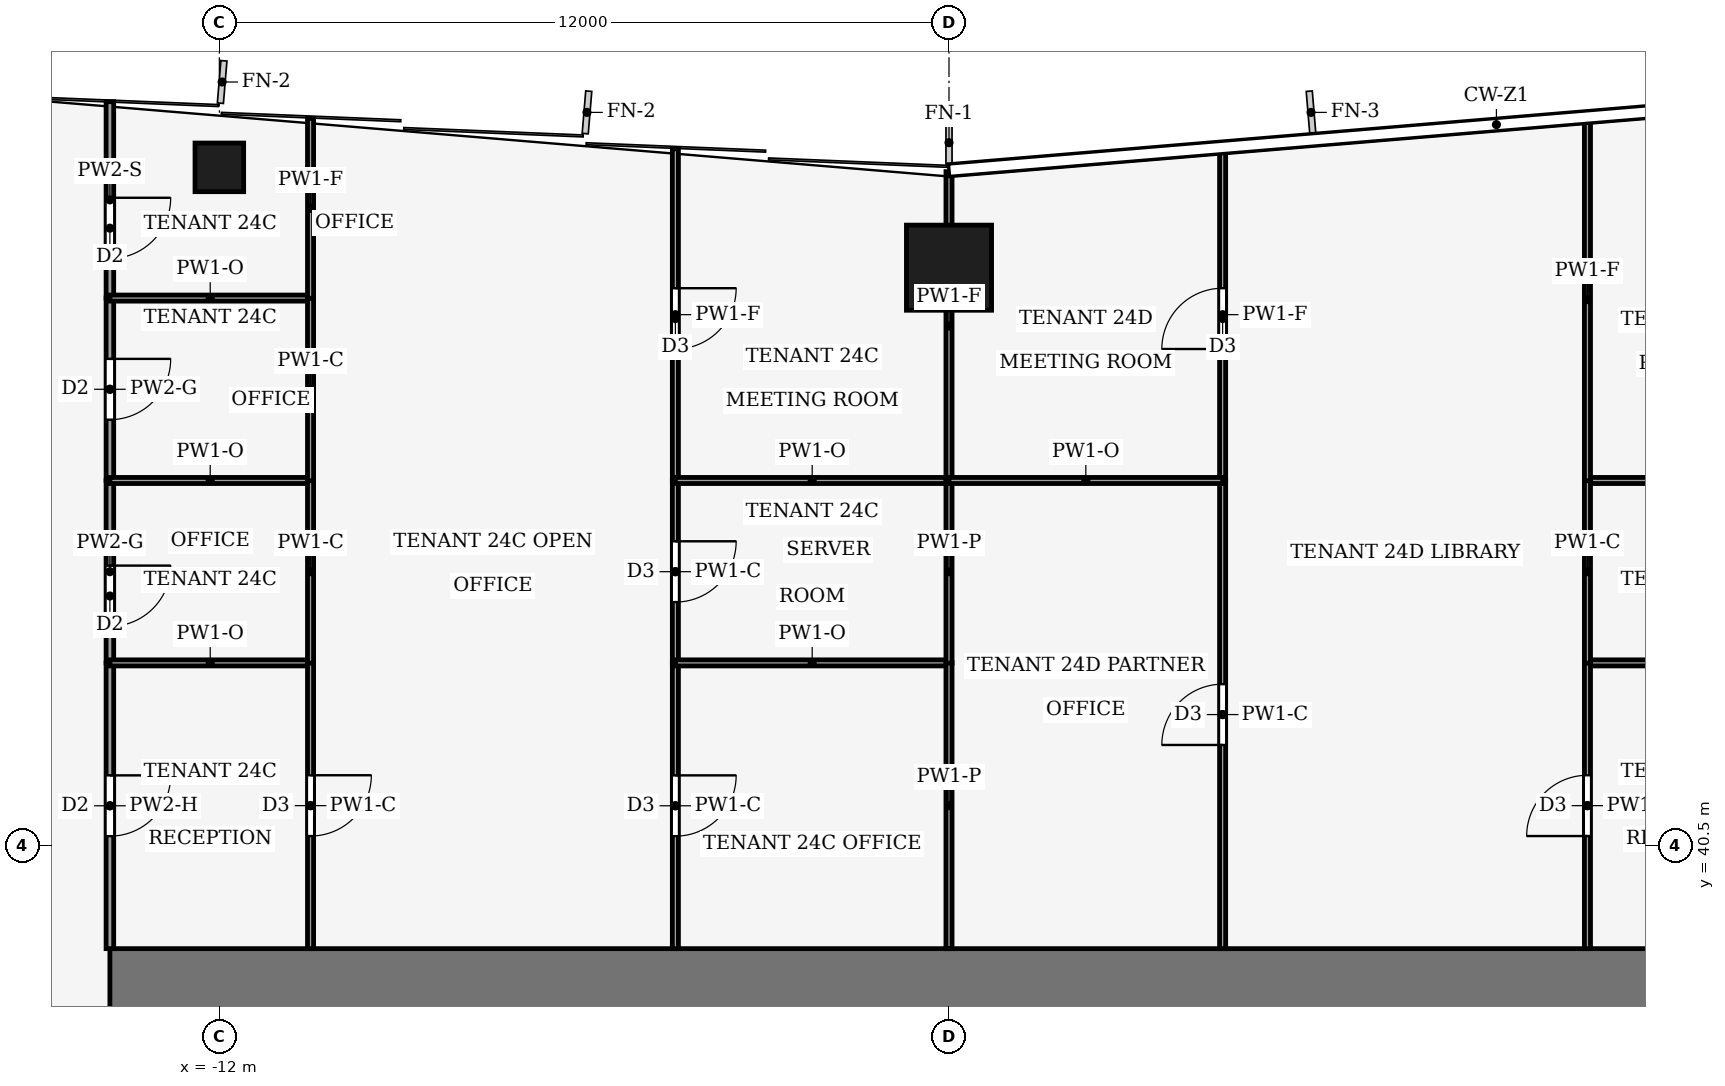
"""IFC4 building model, lengths in metres.
Left out: names, types, materials, properties, quantities, classifications, styles, units other than length and angle.
Written with IfcOpenShell. Run it as: python <this file> out.ifc"""

import sys

from ifc_helpers import new_model, si_unit, direction, frame, frame_2d, origin, origin_2d, place, context, subcontext, project, spatial, rectangle, hollow_rectangle, extrude, element, fill, save


model = new_model("IFC4")
c1 = context("Model", 3, precision=1e-05, world=origin(), true_north=direction((0.0, 1.0)))
c2 = subcontext(c1, "Body", "Model", "MODEL_VIEW")
j1 = project(units=[si_unit("LENGTHUNIT", "METRE"), si_unit("PLANEANGLEUNIT", "RADIAN")], contexts=[c1])
p1 = place(None, origin())
s1 = spatial("IfcSite", under=j1, at=p1, CompositionType="ELEMENT")
p2 = place(p1, origin())
s2 = spatial("IfcBuilding", under=s1, at=p2, CompositionType="ELEMENT")
p3 = place(p2, frame((0.0, 0.0, 106.0)))
s3 = spatial("IfcBuildingStorey", under=s2, at=p3, CompositionType="ELEMENT", Elevation=106.0)
p4 = place(p3, frame((-13.8, 38.2, -0.13), z_axis=(0.0, 0.0, 1.0), x_axis=(1.0, 0.0, 0.0)))
e1 = element("IfcWall", 1, at=p4, inside=s3, PredefinedType="SHEAR", context=c2, shape_type="SweptSolid", body=[
    extrude(rectangle(XDim=27.6, YDim=1.2, at=frame_2d((13.8, 0.0))), origin(), (0.0, 0.0, 1.0), 4.0),
])
p5 = place(p3, frame((0.0, 50.0, 0.0), z_axis=(0.0, 0.0, 1.0), x_axis=(1.0, 0.0, 0.0)))
e2 = element("IfcColumn", 2, at=p5, inside=s3, PredefinedType="COLUMN", context=c2, shape_type="SweptSolid", body=[
    extrude(hollow_rectangle(XDim=1.4, YDim=1.4, WallThickness=0.08, at=origin_2d()), origin(), (0.0, 0.0, 1.0), 4.0),
])
p6 = place(p3, frame((-12.0, 51.65, 0.0), z_axis=(0.0, 0.0, 1.0), x_axis=(1.0, 0.0, 0.0)))
e3 = element("IfcColumn", 3, at=p6, inside=s3, PredefinedType="COLUMN", context=c2, shape_type="SweptSolid", body=[
    extrude(hollow_rectangle(XDim=0.8, YDim=0.8, WallThickness=0.04, at=origin_2d()), origin(), (0.0, 0.0, 1.0), 4.0),
])
p7 = place(p3, frame((-13.8, 43.5, 0.0), z_axis=(0.0, 0.0, 1.0), x_axis=(0.0, -1.0, 0.0)))
e4 = element("IfcWall", 4, at=p7, inside=s3, PredefinedType="PARTITIONING", context=c2, shape_type="SweptSolid", body=[
    extrude(rectangle(XDim=4.7, YDim=0.125, at=frame_2d((2.35, 0.0))), origin(), (0.0, 0.0, 1.0), 3.14),
])
p8 = place(p7, frame((1.85, 0.0, 0.0)))
e5 = element("IfcOpeningElement", 5, at=p8, cuts=e4, PredefinedType="OPENING", context=c2, shape_type="SweptSolid", body=[
    extrude(rectangle(XDim=1.0, YDim=2.1, at=frame_2d((0.5, 1.05))), frame((0.0, 0.073, 0.0), z_axis=(0.0, -1.0, 0.0), x_axis=(1.0, 0.0, 0.0)), (0.0, 0.0, 1.0), 0.145),
])
p9 = place(p3, frame((-13.8, 46.5, 0.0), z_axis=(0.0, 0.0, 1.0), x_axis=(0.0, -1.0, 0.0)))
e6 = element("IfcWall", 6, at=p9, inside=s3, PredefinedType="PARTITIONING", context=c2, shape_type="SweptSolid", body=[
    extrude(rectangle(XDim=3.0, YDim=0.125, at=frame_2d((1.5, 0.0))), origin(), (0.0, 0.0, 1.0), 3.87),
])
p10 = place(p9, frame((1.4, 0.0, 0.0)))
e7 = element("IfcOpeningElement", 7, at=p10, cuts=e6, PredefinedType="OPENING", context=c2, shape_type="SweptSolid", body=[
    extrude(rectangle(XDim=1.0, YDim=2.1, at=frame_2d((0.5, 1.05))), frame((0.0, 0.073, 0.0), z_axis=(0.0, -1.0, 0.0), x_axis=(1.0, 0.0, 0.0)), (0.0, 0.0, 1.0), 0.145),
])
p11 = place(p3, frame((-13.8, 49.5, 0.0), z_axis=(0.0, 0.0, 1.0), x_axis=(0.0, -1.0, 0.0)))
e8 = element("IfcWall", 8, at=p11, inside=s3, PredefinedType="PARTITIONING", context=c2, shape_type="SweptSolid", body=[
    extrude(rectangle(XDim=3.0, YDim=0.125, at=frame_2d((1.5, 0.0))), origin(), (0.0, 0.0, 1.0), 3.87),
])
p12 = place(p11, frame((1.0, 0.0, 0.0)))
e9 = element("IfcOpeningElement", 9, at=p12, cuts=e8, PredefinedType="OPENING", context=c2, shape_type="SweptSolid", body=[
    extrude(rectangle(XDim=1.0, YDim=2.1, at=frame_2d((0.5, 1.05))), frame((0.0, 0.073, 0.0), z_axis=(0.0, -1.0, 0.0), x_axis=(1.0, 0.0, 0.0)), (0.0, 0.0, 1.0), 0.145),
])
p13 = place(p3, frame((-13.8, 52.73, 0.0), z_axis=(0.0, 0.0, 1.0), x_axis=(0.0, -1.0, 0.0)))
e10 = element("IfcWall", 10, at=p13, inside=s3, PredefinedType="PARTITIONING", context=c2, shape_type="SweptSolid", body=[
    extrude(rectangle(XDim=3.23, YDim=0.125, at=frame_2d((1.615, 0.0))), origin(), (0.0, 0.0, 1.0), 3.04),
])
p14 = place(p13, frame((1.58, 0.0, 0.0)))
e11 = element("IfcOpeningElement", 11, at=p14, cuts=e10, PredefinedType="OPENING", context=c2, shape_type="SweptSolid", body=[
    extrude(rectangle(XDim=1.0, YDim=2.1, at=frame_2d((0.5, 1.05))), frame((0.0, 0.073, 0.0), z_axis=(0.0, -1.0, 0.0), x_axis=(1.0, 0.0, 0.0)), (0.0, 0.0, 1.0), 0.145),
])
p15 = place(p3, frame((-10.5, 43.5, 0.0), z_axis=(0.0, 0.0, 1.0), x_axis=(-1.0, 0.0, 0.0)))
e12 = element("IfcWall", 12, at=p15, inside=s3, PredefinedType="PARTITIONING", context=c2, shape_type="SweptSolid", body=[
    extrude(rectangle(XDim=3.3, YDim=0.1, at=frame_2d((1.65, 0.0))), origin(), (0.0, 0.0, 1.0), 3.39),
])
p16 = place(p3, frame((-10.5, 43.504, 0.0), z_axis=(0.0, 0.0, 1.0), x_axis=(0.0, -1.0, 0.0)))
e13 = element("IfcWall", 13, at=p16, inside=s3, PredefinedType="PARTITIONING", context=c2, shape_type="SweptSolid", body=[
    extrude(rectangle(XDim=4.704, YDim=0.1, at=frame_2d((2.352, 0.0))), origin(), (0.0, 0.0, 1.0), 3.87),
])
p17 = place(p16, frame((1.852, 0.0, 0.0)))
e14 = element("IfcOpeningElement", 14, at=p17, cuts=e13, PredefinedType="OPENING", context=c2, shape_type="SweptSolid", body=[
    extrude(rectangle(XDim=1.0, YDim=2.1, at=frame_2d((0.5, 1.05))), frame((0.0, 0.06, 0.0), z_axis=(0.0, -1.0, 0.0), x_axis=(1.0, 0.0, 0.0)), (0.0, 0.0, 1.0), 0.12),
])
p18 = place(p3, frame((-10.5, 46.5, 0.0), z_axis=(0.0, 0.0, 1.0), x_axis=(-1.0, 0.0, 0.0)))
e15 = element("IfcWall", 15, at=p18, inside=s3, PredefinedType="PARTITIONING", context=c2, shape_type="SweptSolid", body=[
    extrude(rectangle(XDim=3.3, YDim=0.1, at=frame_2d((1.65, 0.0))), origin(), (0.0, 0.0, 1.0), 3.39),
])
p19 = place(p3, frame((-10.5, 43.496, 0.0), z_axis=(0.0, 0.0, 1.0), x_axis=(0.0, 1.0, 0.0)))
e16 = element("IfcWall", 16, at=p19, inside=s3, PredefinedType="PARTITIONING", context=c2, shape_type="SweptSolid", body=[
    extrude(rectangle(XDim=3.008, YDim=0.1, at=frame_2d((1.504, 0.0))), origin(), (0.0, 0.0, 1.0), 3.87),
])
p20 = place(p3, frame((-10.5, 49.5, 0.0), z_axis=(0.0, 0.0, 1.0), x_axis=(-1.0, 0.0, 0.0)))
e17 = element("IfcWall", 17, at=p20, inside=s3, PredefinedType="PARTITIONING", context=c2, shape_type="SweptSolid", body=[
    extrude(rectangle(XDim=3.3, YDim=0.1, at=frame_2d((1.65, 0.0))), origin(), (0.0, 0.0, 1.0), 3.39),
])
p21 = place(p3, frame((-10.5, 46.496, 0.0), z_axis=(0.0, 0.0, 1.0), x_axis=(0.0, 1.0, 0.0)))
e18 = element("IfcWall", 18, at=p21, inside=s3, PredefinedType="PARTITIONING", context=c2, shape_type="SweptSolid", body=[
    extrude(rectangle(XDim=3.008, YDim=0.1, at=frame_2d((1.504, 0.0))), origin(), (0.0, 0.0, 1.0), 3.87),
])
p22 = place(p3, frame((-10.5, 49.496, 0.0), z_axis=(0.0, 0.0, 1.0), x_axis=(0.0, 1.0, 0.0)))
e19 = element("IfcWall", 19, at=p22, inside=s3, PredefinedType="PARTITIONING", context=c2, shape_type="SweptSolid", body=[
    extrude(rectangle(XDim=2.959, YDim=0.1, at=frame_2d((1.479, 0.0))), origin(), (0.0, 0.0, 1.0), 3.04),
])
p23 = place(p3, frame((-4.5, 43.5, 0.0), z_axis=(0.0, 0.0, 1.0), x_axis=(0.0, -1.0, 0.0)))
e20 = element("IfcWall", 20, at=p23, inside=s3, PredefinedType="PARTITIONING", context=c2, shape_type="SweptSolid", body=[
    extrude(rectangle(XDim=4.7, YDim=0.1, at=frame_2d((2.35, 0.0))), origin(), (0.0, 0.0, 1.0), 3.87),
])
p24 = place(p23, frame((1.85, 0.0, 0.0)))
e21 = element("IfcOpeningElement", 21, at=p24, cuts=e20, PredefinedType="OPENING", context=c2, shape_type="SweptSolid", body=[
    extrude(rectangle(XDim=1.0, YDim=2.1, at=frame_2d((0.5, 1.05))), frame((0.0, 0.06, 0.0), z_axis=(0.0, -1.0, 0.0), x_axis=(1.0, 0.0, 0.0)), (0.0, 0.0, 1.0), 0.12),
])
p25 = place(p3, frame((-4.5, 46.5, 0.0), z_axis=(0.0, 0.0, 1.0), x_axis=(0.0, -1.0, 0.0)))
e22 = element("IfcWall", 22, at=p25, inside=s3, PredefinedType="PARTITIONING", context=c2, shape_type="SweptSolid", body=[
    extrude(rectangle(XDim=3.0, YDim=0.1, at=frame_2d((1.5, 0.0))), origin(), (0.0, 0.0, 1.0), 3.87),
])
p26 = place(p25, frame((1.0, 0.0, 0.0)))
e23 = element("IfcOpeningElement", 23, at=p26, cuts=e22, PredefinedType="OPENING", context=c2, shape_type="SweptSolid", body=[
    extrude(rectangle(XDim=1.0, YDim=2.1, at=frame_2d((0.5, 1.05))), frame((0.0, 0.06, 0.0), z_axis=(0.0, -1.0, 0.0), x_axis=(1.0, 0.0, 0.0)), (0.0, 0.0, 1.0), 0.12),
])
p27 = place(p3, frame((-4.5, 51.955, 0.0), z_axis=(0.0, 0.0, 1.0), x_axis=(0.0, -1.0, 0.0)))
e24 = element("IfcWall", 24, at=p27, inside=s3, PredefinedType="PARTITIONING", context=c2, shape_type="SweptSolid", body=[
    extrude(rectangle(XDim=5.455, YDim=0.1, at=frame_2d((2.728, 0.0))), origin(), (0.0, 0.0, 1.0), 3.04),
])
p28 = place(p27, frame((2.292, 0.0, 0.0)))
e25 = element("IfcOpeningElement", 25, at=p28, cuts=e24, PredefinedType="OPENING", context=c2, shape_type="SweptSolid", body=[
    extrude(rectangle(XDim=1.0, YDim=2.1, at=frame_2d((0.5, 1.05))), frame((0.0, 0.06, 0.0), z_axis=(0.0, -1.0, 0.0), x_axis=(1.0, 0.0, 0.0)), (0.0, 0.0, 1.0), 0.12),
])
p29 = place(p3, frame((0.0, 43.5, 0.0), z_axis=(0.0, 0.0, 1.0), x_axis=(-1.0, 0.0, 0.0)))
e26 = element("IfcWall", 26, at=p29, inside=s3, PredefinedType="PARTITIONING", context=c2, shape_type="SweptSolid", body=[
    extrude(rectangle(XDim=4.5, YDim=0.1, at=frame_2d((2.25, 0.0))), origin(), (0.0, 0.0, 1.0), 3.39),
])
p30 = place(p3, frame((0.0, 38.8, 0.0), z_axis=(0.0, 0.0, 1.0), x_axis=(0.0, 1.0, 0.0)))
e27 = element("IfcWall", 27, at=p30, inside=s3, PredefinedType="PARTITIONING", context=c2, shape_type="SweptSolid", body=[
    extrude(rectangle(XDim=4.704, YDim=0.1, at=frame_2d((2.352, 0.0))), origin(), (0.0, 0.0, 1.0), 3.44),
])
p31 = place(p3, frame((0.0, 46.5, 0.0), z_axis=(0.0, 0.0, 1.0), x_axis=(-1.0, 0.0, 0.0)))
e28 = element("IfcWall", 28, at=p31, inside=s3, PredefinedType="PARTITIONING", context=c2, shape_type="SweptSolid", body=[
    extrude(rectangle(XDim=4.5, YDim=0.1, at=frame_2d((2.25, 0.0))), origin(), (0.0, 0.0, 1.0), 3.39),
])
p32 = place(p3, frame((0.0, 43.496, 0.0), z_axis=(0.0, 0.0, 1.0), x_axis=(0.0, 1.0, 0.0)))
e29 = element("IfcWall", 29, at=p32, inside=s3, PredefinedType="PARTITIONING", context=c2, shape_type="SweptSolid", body=[
    extrude(rectangle(XDim=3.004, YDim=0.1, at=frame_2d((1.502, 0.0))), origin(), (0.0, 0.0, 1.0), 3.44),
])
p33 = place(p3, frame((0.0, 46.5, 0.0), z_axis=(0.0, 0.0, 1.0), x_axis=(0.0, 1.0, 0.0)))
e30 = element("IfcWall", 30, at=p33, inside=s3, PredefinedType="PARTITIONING", context=c2, shape_type="SweptSolid", body=[
    extrude(rectangle(XDim=5.08, YDim=0.1, at=frame_2d((2.54, 0.0))), origin(), (0.0, 0.0, 1.0), 3.04),
])
p34 = place(p3, frame((13.8, 43.5, 0.0), z_axis=(0.0, 0.0, 1.0), x_axis=(-1.0, 0.0, 0.0)))
e31 = element("IfcWall", 31, at=p34, inside=s3, PredefinedType="PARTITIONING", context=c2, shape_type="SweptSolid", body=[
    extrude(rectangle(XDim=3.3, YDim=0.1, at=frame_2d((1.65, 0.0))), origin(), (0.0, 0.0, 1.0), 3.39),
])
p35 = place(p3, frame((10.5, 38.8, 0.0), z_axis=(0.0, 0.0, 1.0), x_axis=(0.0, 1.0, 0.0)))
e32 = element("IfcWall", 32, at=p35, inside=s3, PredefinedType="PARTITIONING", context=c2, shape_type="SweptSolid", body=[
    extrude(rectangle(XDim=4.704, YDim=0.1, at=frame_2d((2.352, 0.0))), origin(), (0.0, 0.0, 1.0), 3.87),
])
p36 = place(p35, frame((1.852, 0.0, 0.0)))
e33 = element("IfcOpeningElement", 33, at=p36, cuts=e32, PredefinedType="OPENING", context=c2, shape_type="SweptSolid", body=[
    extrude(rectangle(XDim=1.0, YDim=2.1, at=frame_2d((0.5, 1.05))), frame((0.0, 0.06, 0.0), z_axis=(0.0, -1.0, 0.0), x_axis=(1.0, 0.0, 0.0)), (0.0, 0.0, 1.0), 0.12),
])
p37 = place(p3, frame((13.8, 46.5, 0.0), z_axis=(0.0, 0.0, 1.0), x_axis=(-1.0, 0.0, 0.0)))
e34 = element("IfcWall", 34, at=p37, inside=s3, PredefinedType="PARTITIONING", context=c2, shape_type="SweptSolid", body=[
    extrude(rectangle(XDim=3.3, YDim=0.1, at=frame_2d((1.65, 0.0))), origin(), (0.0, 0.0, 1.0), 3.39),
])
p38 = place(p3, frame((10.5, 46.504, 0.0), z_axis=(0.0, 0.0, 1.0), x_axis=(0.0, -1.0, 0.0)))
e35 = element("IfcWall", 35, at=p38, inside=s3, PredefinedType="PARTITIONING", context=c2, shape_type="SweptSolid", body=[
    extrude(rectangle(XDim=3.008, YDim=0.1, at=frame_2d((1.504, 0.0))), origin(), (0.0, 0.0, 1.0), 3.87),
])
p39 = place(p3, frame((10.5, 52.455, 0.0), z_axis=(0.0, 0.0, 1.0), x_axis=(0.0, -1.0, 0.0)))
e36 = element("IfcWall", 36, at=p39, inside=s3, PredefinedType="PARTITIONING", context=c2, shape_type="SweptSolid", body=[
    extrude(rectangle(XDim=5.959, YDim=0.1, at=frame_2d((2.979, 0.0))), origin(), (0.0, 0.0, 1.0), 3.04),
])
p40 = place(p3, frame((4.5, 38.8, 0.0), z_axis=(0.0, 0.0, 1.0), x_axis=(0.0, 1.0, 0.0)))
e37 = element("IfcWall", 37, at=p40, inside=s3, PredefinedType="PARTITIONING", context=c2, shape_type="SweptSolid", body=[
    extrude(rectangle(XDim=7.7, YDim=0.1, at=frame_2d((3.85, 0.0))), origin(), (0.0, 0.0, 1.0), 3.87),
])
p41 = place(p40, frame((3.35, 0.0, 0.0)))
e38 = element("IfcOpeningElement", 38, at=p41, cuts=e37, PredefinedType="OPENING", context=c2, shape_type="SweptSolid", body=[
    extrude(rectangle(XDim=1.0, YDim=2.1, at=frame_2d((0.5, 1.05))), frame((0.0, 0.06, 0.0), z_axis=(0.0, -1.0, 0.0), x_axis=(1.0, 0.0, 0.0)), (0.0, 0.0, 1.0), 0.12),
])
p42 = place(p3, frame((4.5, 46.5, 0.0), z_axis=(0.0, 0.0, 1.0), x_axis=(0.0, 1.0, 0.0)))
e39 = element("IfcWall", 39, at=p42, inside=s3, PredefinedType="PARTITIONING", context=c2, shape_type="SweptSolid", body=[
    extrude(rectangle(XDim=5.455, YDim=0.1, at=frame_2d((2.728, 0.0))), origin(), (0.0, 0.0, 1.0), 3.04),
])
p43 = place(p42, frame((2.162, 0.0, 0.0)))
e40 = element("IfcOpeningElement", 40, at=p43, cuts=e39, PredefinedType="OPENING", context=c2, shape_type="SweptSolid", body=[
    extrude(rectangle(XDim=1.0, YDim=2.1, at=frame_2d((0.5, 1.05))), frame((0.0, 0.06, 0.0), z_axis=(0.0, -1.0, 0.0), x_axis=(1.0, 0.0, 0.0)), (0.0, 0.0, 1.0), 0.12),
])
p44 = place(p3, frame((4.5, 46.5, 0.0), z_axis=(0.0, 0.0, 1.0), x_axis=(-1.0, 0.0, 0.0)))
e41 = element("IfcWall", 41, at=p44, inside=s3, PredefinedType="PARTITIONING", context=c2, shape_type="SweptSolid", body=[
    extrude(rectangle(XDim=4.5, YDim=0.1, at=frame_2d((2.25, 0.0))), origin(), (0.0, 0.0, 1.0), 3.39),
])
p45 = place(p8, origin())
e42 = element("IfcDoor", 42, at=p45, inside=s3, OperationType="SINGLE_SWING_RIGHT", PredefinedType="DOOR", context=c2, shape_type="SweptSolid", body=[
    extrude(rectangle(XDim=1.0, YDim=2.1, at=frame_2d((0.5, 1.05))), frame((0.0, 0.025, 0.0), z_axis=(0.0, -1.0, 0.0), x_axis=(1.0, 0.0, 0.0)), (0.0, 0.0, 1.0), 0.05),
])
fill(e5, e42)
p46 = place(p10, origin())
e43 = element("IfcDoor", 43, at=p46, inside=s3, OperationType="SINGLE_SWING_RIGHT", PredefinedType="DOOR", context=c2, shape_type="SweptSolid", body=[
    extrude(rectangle(XDim=1.0, YDim=2.1, at=frame_2d((0.5, 1.05))), frame((0.0, 0.025, 0.0), z_axis=(0.0, -1.0, 0.0), x_axis=(1.0, 0.0, 0.0)), (0.0, 0.0, 1.0), 0.05),
])
fill(e7, e43)
p47 = place(p12, origin())
e44 = element("IfcDoor", 44, at=p47, inside=s3, OperationType="SINGLE_SWING_RIGHT", PredefinedType="DOOR", context=c2, shape_type="SweptSolid", body=[
    extrude(rectangle(XDim=1.0, YDim=2.1, at=frame_2d((0.5, 1.05))), frame((0.0, 0.025, 0.0), z_axis=(0.0, -1.0, 0.0), x_axis=(1.0, 0.0, 0.0)), (0.0, 0.0, 1.0), 0.05),
])
fill(e9, e44)
p48 = place(p14, origin())
e45 = element("IfcDoor", 45, at=p48, inside=s3, OperationType="SINGLE_SWING_RIGHT", PredefinedType="DOOR", context=c2, shape_type="SweptSolid", body=[
    extrude(rectangle(XDim=1.0, YDim=2.1, at=frame_2d((0.5, 1.05))), frame((0.0, 0.025, 0.0), z_axis=(0.0, -1.0, 0.0), x_axis=(1.0, 0.0, 0.0)), (0.0, 0.0, 1.0), 0.05),
])
fill(e11, e45)
p49 = place(p17, origin())
e46 = element("IfcDoor", 46, at=p49, inside=s3, OperationType="SINGLE_SWING_RIGHT", PredefinedType="DOOR", context=c2, shape_type="SweptSolid", body=[
    extrude(rectangle(XDim=1.0, YDim=2.1, at=frame_2d((0.5, 1.05))), frame((0.0, 0.025, 0.0), z_axis=(0.0, -1.0, 0.0), x_axis=(1.0, 0.0, 0.0)), (0.0, 0.0, 1.0), 0.05),
])
fill(e14, e46)
p50 = place(p24, origin())
e47 = element("IfcDoor", 47, at=p50, inside=s3, OperationType="SINGLE_SWING_LEFT", PredefinedType="DOOR", context=c2, shape_type="SweptSolid", body=[
    extrude(rectangle(XDim=1.0, YDim=2.1, at=frame_2d((0.5, 1.05))), frame((0.0, 0.025, 0.0), z_axis=(0.0, -1.0, 0.0), x_axis=(1.0, 0.0, 0.0)), (0.0, 0.0, 1.0), 0.05),
])
fill(e21, e47)
p51 = place(p26, origin())
e48 = element("IfcDoor", 48, at=p51, inside=s3, OperationType="SINGLE_SWING_RIGHT", PredefinedType="DOOR", context=c2, shape_type="SweptSolid", body=[
    extrude(rectangle(XDim=1.0, YDim=2.1, at=frame_2d((0.5, 1.05))), frame((0.0, 0.025, 0.0), z_axis=(0.0, -1.0, 0.0), x_axis=(1.0, 0.0, 0.0)), (0.0, 0.0, 1.0), 0.05),
])
fill(e23, e48)
p52 = place(p28, origin())
e49 = element("IfcDoor", 49, at=p52, inside=s3, OperationType="SINGLE_SWING_RIGHT", PredefinedType="DOOR", context=c2, shape_type="SweptSolid", body=[
    extrude(rectangle(XDim=1.0, YDim=2.1, at=frame_2d((0.5, 1.05))), frame((0.0, 0.025, 0.0), z_axis=(0.0, -1.0, 0.0), x_axis=(1.0, 0.0, 0.0)), (0.0, 0.0, 1.0), 0.05),
])
fill(e25, e49)
p53 = place(p36, origin())
e50 = element("IfcDoor", 50, at=p53, inside=s3, OperationType="SINGLE_SWING_RIGHT", PredefinedType="DOOR", context=c2, shape_type="SweptSolid", body=[
    extrude(rectangle(XDim=1.0, YDim=2.1, at=frame_2d((0.5, 1.05))), frame((0.0, 0.025, 0.0), z_axis=(0.0, -1.0, 0.0), x_axis=(1.0, 0.0, 0.0)), (0.0, 0.0, 1.0), 0.05),
])
fill(e33, e50)
p54 = place(p41, origin())
e51 = element("IfcDoor", 51, at=p54, inside=s3, OperationType="SINGLE_SWING_LEFT", PredefinedType="DOOR", context=c2, shape_type="SweptSolid", body=[
    extrude(rectangle(XDim=1.0, YDim=2.1, at=frame_2d((0.5, 1.05))), frame((0.0, 0.025, 0.0), z_axis=(0.0, -1.0, 0.0), x_axis=(1.0, 0.0, 0.0)), (0.0, 0.0, 1.0), 0.05),
])
fill(e38, e51)
p55 = place(p43, origin())
e52 = element("IfcDoor", 52, at=p55, inside=s3, OperationType="SINGLE_SWING_LEFT", PredefinedType="DOOR", context=c2, shape_type="SweptSolid", body=[
    extrude(rectangle(XDim=1.0, YDim=2.1, at=frame_2d((0.5, 1.05))), frame((0.0, 0.025, 0.0), z_axis=(0.0, -1.0, 0.0), x_axis=(1.0, 0.0, 0.0)), (0.0, 0.0, 1.0), 0.05),
])
fill(e40, e52)
save(model, sys.argv[1])
